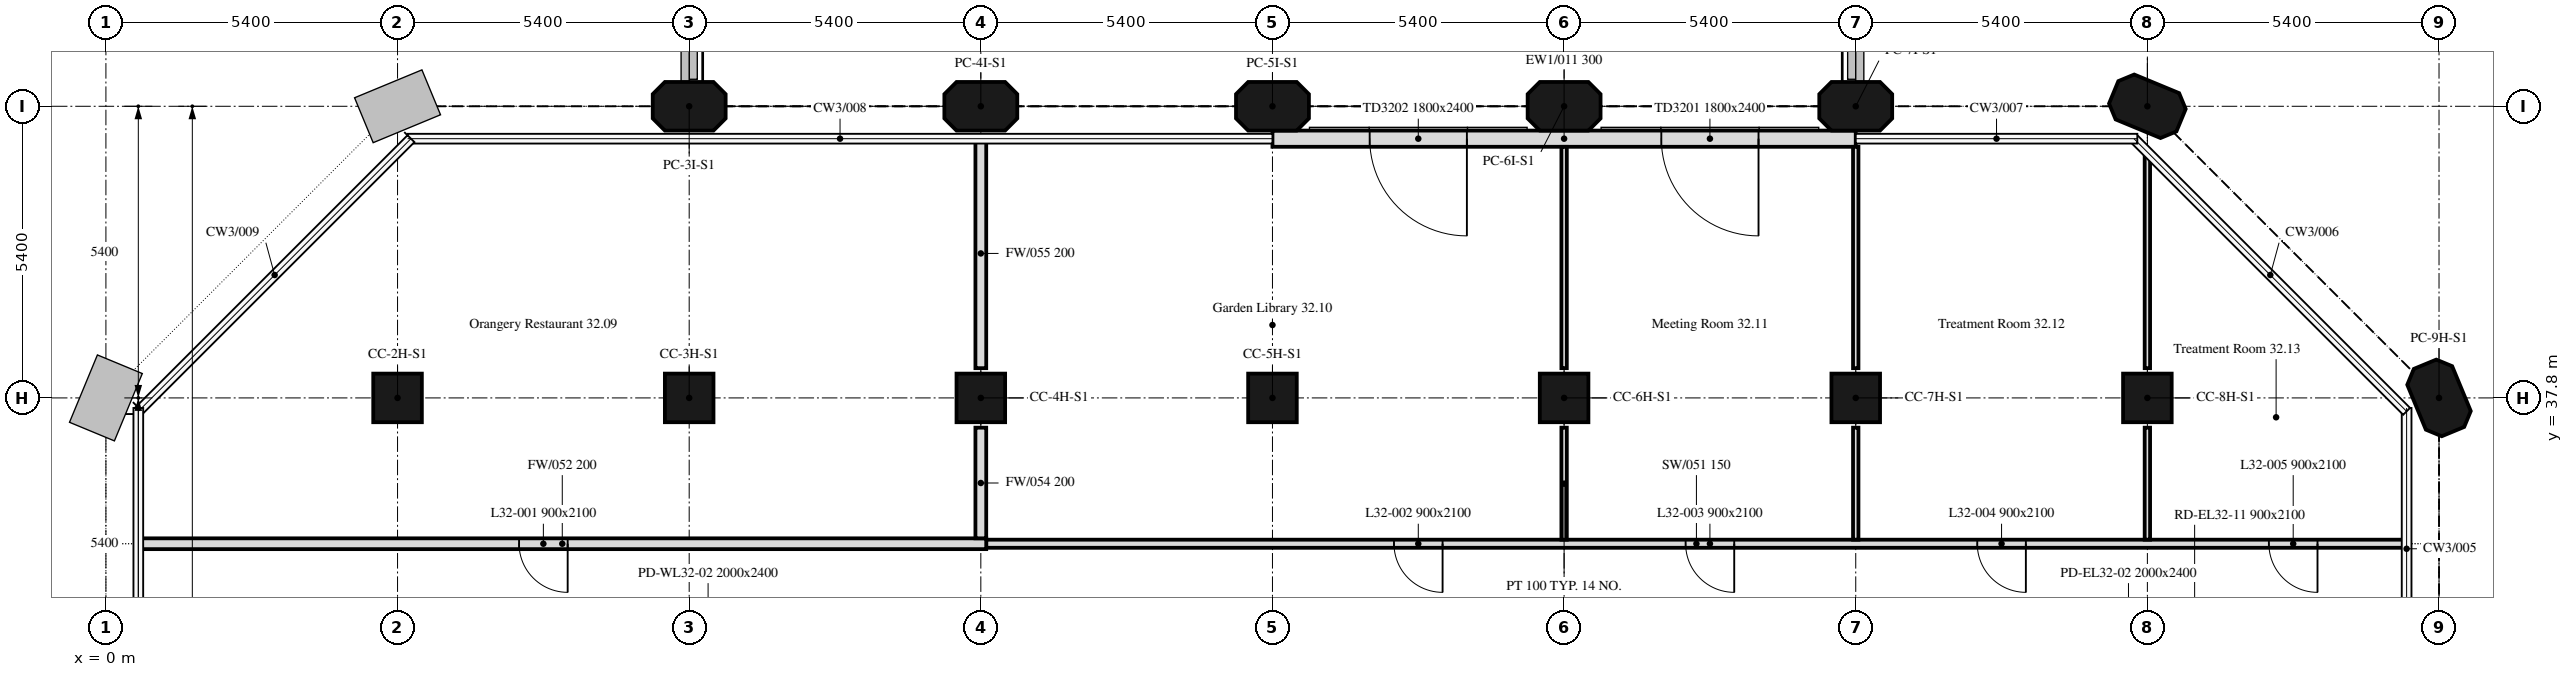
"""IFC4 building model, lengths in metres.
Left out: names, types, materials, properties, quantities, classifications, styles, units other than length and angle.
Written with IfcOpenShell. Run it as: python <this file> out.ifc"""

import sys

from ifc_helpers import new_model, si_unit, direction, frame, frame_2d, origin, origin_2d, place, context, subcontext, project, spatial, polyline, rectangle, outline, extrude, element, fill, save


model = new_model("IFC4")
c1 = context("Model", 3, precision=1e-05, world=origin(), true_north=direction((0.0, 1.0)))
c2 = subcontext(c1, "Body", "Model", "MODEL_VIEW")
j1 = project(units=[si_unit("LENGTHUNIT", "METRE"), si_unit("PLANEANGLEUNIT", "RADIAN")], contexts=[c1])
p1 = place(None, origin())
s1 = spatial("IfcSite", under=j1, at=p1, CompositionType="ELEMENT")
p2 = place(p1, origin())
s2 = spatial("IfcBuilding", under=s1, at=p2, CompositionType="ELEMENT")
p3 = place(p2, frame((0.0, 0.0, 138.4)))
s3 = spatial("IfcBuildingStorey", under=s2, at=p3, CompositionType="ELEMENT", Elevation=138.4)
for number, where, z_axis, x_axis in (
    (1, (5.4, 37.8, 0.0), (0.0, 0.0, 1.0), (1.0, 0.0, 0.0)),
    (2, (10.8, 37.8, 0.0), (0.0, 0.0, 1.0), (1.0, 0.0, 0.0)),
    (3, (16.2, 37.8, 0.0), (0.0, 0.0, 1.0), (1.0, 0.0, 0.0)),
    (4, (21.6, 37.8, 0.0), (0.0, 0.0, 1.0), (1.0, 0.0, 0.0)),
    (5, (27.0, 37.8, 0.0), (0.0, 0.0, 1.0), (1.0, 0.0, 0.0)),
    (6, (32.4, 37.8, 0.0), (0.0, 0.0, 1.0), (1.0, 0.0, 0.0)),
    (7, (37.8, 37.8, 0.0), (0.0, 0.0, 1.0), (1.0, 0.0, 0.0)),
):
    element("IfcColumn", number, at=place(p3, frame(where, z_axis=z_axis, x_axis=x_axis)), inside=s3, PredefinedType="COLUMN", context=c2, shape_type="SweptSolid", body=[
        extrude(rectangle(XDim=0.9, YDim=0.9, at=origin_2d()), origin(), (0.0, 0.0, 1.0), 4.5),
    ])
for number, where, z_axis, x_axis in (
    (8, (43.2, 37.8, 0.0), (0.0, 0.0, 1.0), (-0.383, 0.924, 0.0)),
    (9, (10.8, 43.2, 0.0), (0.0, 0.0, 1.0), (1.0, 0.0, 0.0)),
    (10, (16.2, 43.2, 0.0), (0.0, 0.0, 1.0), (1.0, 0.0, 0.0)),
    (11, (21.6, 43.2, 0.0), (0.0, 0.0, 1.0), (1.0, 0.0, 0.0)),
    (12, (27.0, 43.2, 0.0), (0.0, 0.0, 1.0), (1.0, 0.0, 0.0)),
    (13, (32.4, 43.2, 0.0), (0.0, 0.0, 1.0), (1.0, 0.0, 0.0)),
    (14, (37.8, 43.2, 0.0), (0.0, 0.0, 1.0), (-0.924, 0.383, 0.0)),
):
    element("IfcColumn", number, at=place(p3, frame(where, z_axis=z_axis, x_axis=x_axis)), inside=s3, PredefinedType="COLUMN", context=c2, shape_type="SweptSolid", body=[
        extrude(outline(polyline([(-0.45, -0.45), (0.45, -0.45), (0.675, -0.225), (0.675, 0.225), (0.45, 0.45), (-0.45, 0.45), (-0.675, 0.225), (-0.675, -0.225), (-0.45, -0.45)])), origin(), (0.0, 0.0, 1.0), 4.5),
    ])
p4 = place(p3, frame((32.4, 42.6, 0.0), z_axis=(0.0, 0.0, 1.0), x_axis=(-1.0, 0.0, 0.0)))
e15 = element("IfcWall", 15, at=p4, inside=s3, PredefinedType="SOLIDWALL", context=c2, shape_type="SweptSolid", body=[
    extrude(rectangle(XDim=10.8, YDim=0.3, at=frame_2d((5.4, 0.0))), origin(), (0.0, 0.0, 1.0), 4.5),
])
p5 = place(p4, frame((1.8, 0.0, 0.0)))
e16 = element("IfcOpeningElement", 16, at=p5, cuts=e15, PredefinedType="OPENING", context=c2, shape_type="SweptSolid", body=[
    extrude(rectangle(XDim=1.8, YDim=2.4, at=frame_2d((0.9, 1.2))), frame((0.0, 0.16, 0.0), z_axis=(0.0, -1.0, 0.0), x_axis=(1.0, 0.0, 0.0)), (0.0, 0.0, 1.0), 0.32),
])
p6 = place(p4, frame((7.2, 0.0, 0.0)))
e17 = element("IfcOpeningElement", 17, at=p6, cuts=e15, PredefinedType="OPENING", context=c2, shape_type="SweptSolid", body=[
    extrude(rectangle(XDim=1.8, YDim=2.4, at=frame_2d((0.9, 1.2))), frame((0.0, 0.16, 0.0), z_axis=(0.0, -1.0, 0.0), x_axis=(1.0, 0.0, 0.0)), (0.0, 0.0, 1.0), 0.32),
])
p7 = place(p3, frame((42.6, 35.1, 0.0), z_axis=(0.0, 0.0, 1.0), x_axis=(-1.0, 0.0, 0.0)))
e18 = element("IfcWall", 18, at=p7, inside=s3, PredefinedType="PARTITIONING", context=c2, shape_type="SweptSolid", body=[
    extrude(rectangle(XDim=26.3, YDim=0.15, at=frame_2d((13.15, 0.0))), origin(), (0.0, 0.0, 1.0), 4.5),
])
p8 = place(p7, frame((17.85, 0.0, 0.0)))
e19 = element("IfcOpeningElement", 19, at=p8, cuts=e18, PredefinedType="OPENING", context=c2, shape_type="SweptSolid", body=[
    extrude(rectangle(XDim=0.9, YDim=2.1, at=frame_2d((0.45, 1.05))), frame((0.0, 0.075, 0.0), z_axis=(0.0, -1.0, 0.0), x_axis=(1.0, 0.0, 0.0)), (0.0, 0.0, 1.0), 0.15),
])
p9 = place(p7, frame((12.45, 0.0, 0.0)))
e20 = element("IfcOpeningElement", 20, at=p9, cuts=e18, PredefinedType="OPENING", context=c2, shape_type="SweptSolid", body=[
    extrude(rectangle(XDim=0.9, YDim=2.1, at=frame_2d((0.45, 1.05))), frame((0.0, 0.075, 0.0), z_axis=(0.0, -1.0, 0.0), x_axis=(1.0, 0.0, 0.0)), (0.0, 0.0, 1.0), 0.15),
])
p10 = place(p7, frame((7.05, 0.0, 0.0)))
e21 = element("IfcOpeningElement", 21, at=p10, cuts=e18, PredefinedType="OPENING", context=c2, shape_type="SweptSolid", body=[
    extrude(rectangle(XDim=0.9, YDim=2.1, at=frame_2d((0.45, 1.05))), frame((0.0, 0.075, 0.0), z_axis=(0.0, -1.0, 0.0), x_axis=(1.0, 0.0, 0.0)), (0.0, 0.0, 1.0), 0.15),
])
p11 = place(p7, frame((1.65, 0.0, 0.0)))
e22 = element("IfcOpeningElement", 22, at=p11, cuts=e18, PredefinedType="OPENING", context=c2, shape_type="SweptSolid", body=[
    extrude(rectangle(XDim=0.9, YDim=2.1, at=frame_2d((0.45, 1.05))), frame((0.0, 0.075, 0.0), z_axis=(0.0, -1.0, 0.0), x_axis=(1.0, 0.0, 0.0)), (0.0, 0.0, 1.0), 0.15),
])
p12 = place(p3, frame((16.3, 35.1, 0.0), z_axis=(0.0, 0.0, 1.0), x_axis=(-1.0, 0.0, 0.0)))
e23 = element("IfcWall", 23, at=p12, inside=s3, PredefinedType="PARTITIONING", context=c2, shape_type="SweptSolid", body=[
    extrude(rectangle(XDim=15.7, YDim=0.2, at=frame_2d((7.85, 0.0))), origin(), (0.0, 0.0, 1.0), 4.5),
])
p13 = place(p12, frame((7.75, 0.0, 0.0)))
e24 = element("IfcOpeningElement", 24, at=p13, cuts=e23, PredefinedType="OPENING", context=c2, shape_type="SweptSolid", body=[
    extrude(rectangle(XDim=0.9, YDim=2.1, at=frame_2d((0.45, 1.05))), frame((0.0, 0.1, 0.0), z_axis=(0.0, -1.0, 0.0), x_axis=(1.0, 0.0, 0.0)), (0.0, 0.0, 1.0), 0.2),
])
p14 = place(p3, frame((16.2, 35.2, 0.0), z_axis=(0.0, 0.0, 1.0), x_axis=(0.0, 1.0, 0.0)))
e25 = element("IfcWall", 25, at=p14, inside=s3, PredefinedType="PARTITIONING", context=c2, shape_type="SweptSolid", body=[
    extrude(rectangle(XDim=2.049, YDim=0.2, at=frame_2d((1.025, 0.0))), origin(), (0.0, 0.0, 1.0), 4.5),
])
p15 = place(p3, frame((16.2, 38.351, 0.0), z_axis=(0.0, 0.0, 1.0), x_axis=(0.0, 1.0, 0.0)))
e26 = element("IfcWall", 26, at=p15, inside=s3, PredefinedType="PARTITIONING", context=c2, shape_type="SweptSolid", body=[
    extrude(rectangle(XDim=4.25, YDim=0.2, at=frame_2d((2.125, 0.0))), origin(), (0.0, 0.0, 1.0), 4.5),
])
p16 = place(p3, frame((27.0, 35.175, 0.0), z_axis=(0.0, 0.0, 1.0), x_axis=(0.0, 1.0, 0.0)))
e27 = element("IfcWall", 27, at=p16, inside=s3, PredefinedType="PARTITIONING", context=c2, shape_type="SweptSolid", body=[
    extrude(rectangle(XDim=2.074, YDim=0.1, at=frame_2d((1.037, 0.0))), origin(), (0.0, 0.0, 1.0), 4.5),
])
p17 = place(p3, frame((27.0, 38.351, 0.0), z_axis=(0.0, 0.0, 1.0), x_axis=(0.0, 1.0, 0.0)))
e28 = element("IfcWall", 28, at=p17, inside=s3, PredefinedType="PARTITIONING", context=c2, shape_type="SweptSolid", body=[
    extrude(rectangle(XDim=4.098, YDim=0.1, at=frame_2d((2.049, 0.0))), origin(), (0.0, 0.0, 1.0), 4.5),
])
p18 = place(p3, frame((32.4, 35.175, 0.0), z_axis=(0.0, 0.0, 1.0), x_axis=(0.0, 1.0, 0.0)))
e29 = element("IfcWall", 29, at=p18, inside=s3, PredefinedType="PARTITIONING", context=c2, shape_type="SweptSolid", body=[
    extrude(rectangle(XDim=2.074, YDim=0.1, at=frame_2d((1.037, 0.0))), origin(), (0.0, 0.0, 1.0), 4.5),
])
p19 = place(p3, frame((32.4, 38.351, 0.0), z_axis=(0.0, 0.0, 1.0), x_axis=(0.0, 1.0, 0.0)))
e30 = element("IfcWall", 30, at=p19, inside=s3, PredefinedType="PARTITIONING", context=c2, shape_type="SweptSolid", body=[
    extrude(rectangle(XDim=4.098, YDim=0.1, at=frame_2d((2.049, 0.0))), origin(), (0.0, 0.0, 1.0), 4.5),
])
p20 = place(p3, frame((37.8, 35.175, 0.0), z_axis=(0.0, 0.0, 1.0), x_axis=(0.0, 1.0, 0.0)))
e31 = element("IfcWall", 31, at=p20, inside=s3, PredefinedType="PARTITIONING", context=c2, shape_type="SweptSolid", body=[
    extrude(rectangle(XDim=2.074, YDim=0.1, at=frame_2d((1.037, 0.0))), origin(), (0.0, 0.0, 1.0), 4.5),
])
p21 = place(p3, frame((37.8, 38.351, 0.0), z_axis=(0.0, 0.0, 1.0), x_axis=(0.0, 1.0, 0.0)))
e32 = element("IfcWall", 32, at=p21, inside=s3, PredefinedType="PARTITIONING", context=c2, shape_type="SweptSolid", body=[
    extrude(rectangle(XDim=3.951, YDim=0.1, at=frame_2d((1.976, 0.0))), origin(), (0.0, 0.0, 1.0), 4.5),
])
p22 = place(p5, origin())
e33 = element("IfcDoor", 33, at=p22, inside=s3, OperationType="DOUBLE_DOOR_DOUBLE_SWING", PredefinedType="DOOR", context=c2, shape_type="SweptSolid", body=[
    extrude(rectangle(XDim=1.8, YDim=2.4, at=frame_2d((0.9, 1.2))), frame((0.0, 0.025, 0.0), z_axis=(0.0, -1.0, 0.0), x_axis=(1.0, 0.0, 0.0)), (0.0, 0.0, 1.0), 0.05),
])
fill(e16, e33)
p23 = place(p6, origin())
e34 = element("IfcDoor", 34, at=p23, inside=s3, OperationType="DOUBLE_DOOR_DOUBLE_SWING", PredefinedType="DOOR", context=c2, shape_type="SweptSolid", body=[
    extrude(rectangle(XDim=1.8, YDim=2.4, at=frame_2d((0.9, 1.2))), frame((0.0, 0.025, 0.0), z_axis=(0.0, -1.0, 0.0), x_axis=(1.0, 0.0, 0.0)), (0.0, 0.0, 1.0), 0.05),
])
fill(e17, e34)
p24 = place(p13, origin())
e35 = element("IfcDoor", 35, at=p24, inside=s3, OperationType="SINGLE_SWING_RIGHT", PredefinedType="DOOR", context=c2, shape_type="SweptSolid", body=[
    extrude(rectangle(XDim=0.9, YDim=2.1, at=frame_2d((0.45, 1.05))), frame((0.0, 0.025, 0.0), z_axis=(0.0, -1.0, 0.0), x_axis=(1.0, 0.0, 0.0)), (0.0, 0.0, 1.0), 0.05),
])
fill(e24, e35)
p25 = place(p8, origin())
e36 = element("IfcDoor", 36, at=p25, inside=s3, OperationType="SINGLE_SWING_RIGHT", PredefinedType="DOOR", context=c2, shape_type="SweptSolid", body=[
    extrude(rectangle(XDim=0.9, YDim=2.1, at=frame_2d((0.45, 1.05))), frame((0.0, 0.025, 0.0), z_axis=(0.0, -1.0, 0.0), x_axis=(1.0, 0.0, 0.0)), (0.0, 0.0, 1.0), 0.05),
])
fill(e19, e36)
p26 = place(p9, origin())
e37 = element("IfcDoor", 37, at=p26, inside=s3, OperationType="SINGLE_SWING_RIGHT", PredefinedType="DOOR", context=c2, shape_type="SweptSolid", body=[
    extrude(rectangle(XDim=0.9, YDim=2.1, at=frame_2d((0.45, 1.05))), frame((0.0, 0.025, 0.0), z_axis=(0.0, -1.0, 0.0), x_axis=(1.0, 0.0, 0.0)), (0.0, 0.0, 1.0), 0.05),
])
fill(e20, e37)
p27 = place(p10, origin())
e38 = element("IfcDoor", 38, at=p27, inside=s3, OperationType="SINGLE_SWING_LEFT", PredefinedType="DOOR", context=c2, shape_type="SweptSolid", body=[
    extrude(rectangle(XDim=0.9, YDim=2.1, at=frame_2d((0.45, 1.05))), frame((0.0, 0.025, 0.0), z_axis=(0.0, -1.0, 0.0), x_axis=(1.0, 0.0, 0.0)), (0.0, 0.0, 1.0), 0.05),
])
fill(e21, e38)
p28 = place(p11, origin())
e39 = element("IfcDoor", 39, at=p28, inside=s3, OperationType="SINGLE_SWING_LEFT", PredefinedType="DOOR", context=c2, shape_type="SweptSolid", body=[
    extrude(rectangle(XDim=0.9, YDim=2.1, at=frame_2d((0.45, 1.05))), frame((0.0, 0.025, 0.0), z_axis=(0.0, -1.0, 0.0), x_axis=(1.0, 0.0, 0.0)), (0.0, 0.0, 1.0), 0.05),
])
fill(e22, e39)
save(model, sys.argv[1])
